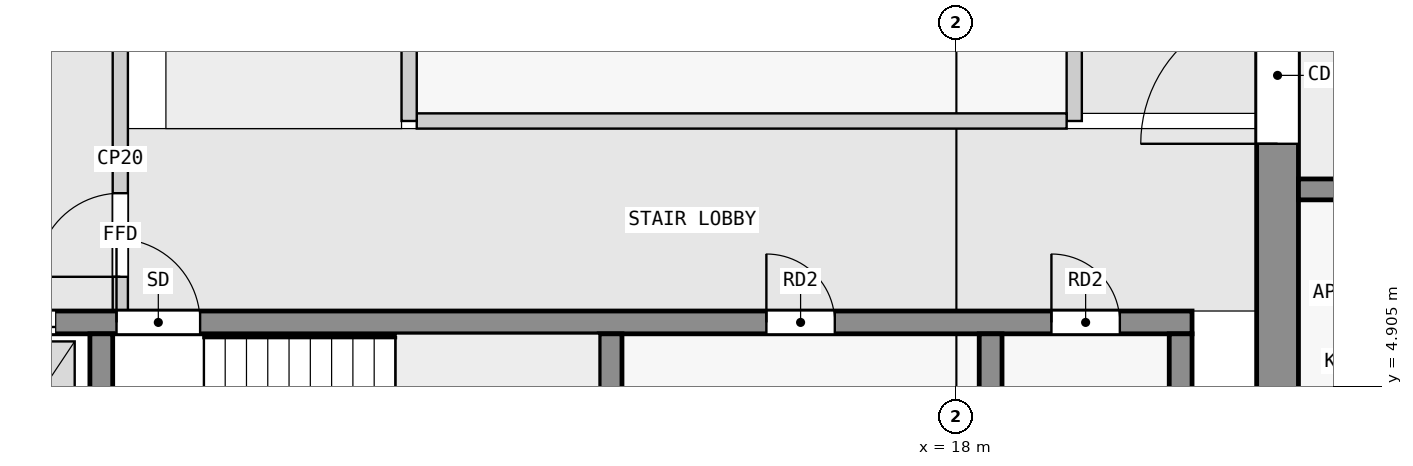
"""IFC4 building model, lengths in metres.
Left out: names, types, materials, properties, quantities, classifications, styles, units other than length and angle.
Written with IfcOpenShell. Run it as: python <this file> out.ifc"""

import sys

from ifc_helpers import new_model, si_unit, direction, frame, frame_2d, origin, place, context, subcontext, project, spatial, rectangle, extrude, element, fill, save


model = new_model("IFC4")
c1 = context("Model", 3, precision=1e-05, world=origin(), true_north=direction((0.0, 1.0)))
c2 = subcontext(c1, "Body", "Model", "MODEL_VIEW")
j1 = project(units=[si_unit("LENGTHUNIT", "METRE"), si_unit("PLANEANGLEUNIT", "RADIAN")], contexts=[c1])
p1 = place(None, origin())
s1 = spatial("IfcSite", under=j1, at=p1, CompositionType="ELEMENT")
p2 = place(p1, origin())
s2 = spatial("IfcBuilding", under=s1, at=p2, CompositionType="ELEMENT")
p3 = place(p2, frame((0.0, 0.0, 211.9)))
s3 = spatial("IfcBuildingStorey", under=s2, at=p3, CompositionType="ELEMENT", Elevation=211.9)
p4 = place(p3, frame((22.225, 2.5, 0.0), z_axis=(0.0, 0.0, 1.0), x_axis=(0.0, 1.0, 0.0)))
e1 = element("IfcWall", 1, at=p4, inside=s3, PredefinedType="SHEAR", context=c2, shape_type="SweptSolid", body=[
    extrude(rectangle(XDim=14.95, YDim=0.55, at=frame_2d((7.475, 0.0))), origin(), (0.0, 0.0, 1.0), 3.25),
])
p5 = place(p4, frame((5.6, 0.0, 0.0)))
e2 = element("IfcOpeningElement", 2, at=p5, cuts=e1, PredefinedType="OPENING", context=c2, shape_type="SweptSolid", body=[
    extrude(rectangle(XDim=1.8, YDim=2.1, at=frame_2d((0.9, 1.05))), frame((0.0, 0.285, 0.0), z_axis=(0.0, -1.0, 0.0), x_axis=(1.0, 0.0, 0.0)), (0.0, 0.0, 1.0), 0.57),
])
for number, where, z_axis, x_axis in (
    (3, (6.75, 2.8, 0.0), (0.0, 0.0, 1.0), (0.0, 1.0, 0.0)),
    (4, (13.45, 2.8, 0.0), (0.0, 0.0, 1.0), (0.0, 1.0, 0.0)),
    (5, (18.45, 2.8, 0.0), (0.0, 0.0, 1.0), (0.0, 1.0, 0.0)),
    (6, (20.95, 2.8, 0.0), (0.0, 0.0, 1.0), (0.0, 1.0, 0.0)),
):
    element("IfcWall", number, at=place(p3, frame(where, z_axis=z_axis, x_axis=x_axis)), inside=s3, PredefinedType="SHEAR", context=c2, shape_type="SweptSolid", body=[
        extrude(rectangle(XDim=2.8, YDim=0.3, at=frame_2d((1.4, 0.0))), origin(), (0.0, 0.0, 1.0), 3.25),
    ])
p6 = place(p3, frame((2.3, 5.75, 0.0), z_axis=(0.0, 0.0, 1.0), x_axis=(1.0, 0.0, 0.0)))
e7 = element("IfcWall", 7, at=p6, inside=s3, PredefinedType="SHEAR", context=c2, shape_type="SweptSolid", body=[
    extrude(rectangle(XDim=18.8, YDim=0.3, at=frame_2d((9.4, 0.0))), origin(), (0.0, 0.0, 1.0), 3.25),
])
p7 = place(p6, frame((4.65, 0.0, 0.0)))
e8 = element("IfcOpeningElement", 8, at=p7, cuts=e7, PredefinedType="OPENING", context=c2, shape_type="SweptSolid", body=[
    extrude(rectangle(XDim=1.1, YDim=2.1, at=frame_2d((0.55, 1.05))), frame((0.0, 0.16, 0.0), z_axis=(0.0, -1.0, 0.0), x_axis=(1.0, 0.0, 0.0)), (0.0, 0.0, 1.0), 0.32),
])
p8 = place(p6, frame((0.45, 0.0, 0.0)))
e9 = element("IfcOpeningElement", 9, at=p8, cuts=e7, PredefinedType="OPENING", context=c2, shape_type="SweptSolid", body=[
    extrude(rectangle(XDim=1.1, YDim=2.1, at=frame_2d((0.55, 1.05))), frame((0.0, 0.16, 0.0), z_axis=(0.0, -1.0, 0.0), x_axis=(1.0, 0.0, 0.0)), (0.0, 0.0, 1.0), 0.32),
])
p9 = place(p6, frame((2.75, 0.0, 0.0)))
e10 = element("IfcOpeningElement", 10, at=p9, cuts=e7, PredefinedType="OPENING", context=c2, shape_type="SweptSolid", body=[
    extrude(rectangle(XDim=1.1, YDim=2.1, at=frame_2d((0.55, 1.05))), frame((0.0, 0.16, 0.0), z_axis=(0.0, -1.0, 0.0), x_axis=(1.0, 0.0, 0.0)), (0.0, 0.0, 1.0), 0.32),
])
p10 = place(p6, frame((13.2, 0.0, 0.0)))
e11 = element("IfcOpeningElement", 11, at=p10, cuts=e7, PredefinedType="OPENING", context=c2, shape_type="SweptSolid", body=[
    extrude(rectangle(XDim=0.9, YDim=2.1, at=frame_2d((0.45, 1.05))), frame((0.0, 0.16, 0.0), z_axis=(0.0, -1.0, 0.0), x_axis=(1.0, 0.0, 0.0)), (0.0, 0.0, 1.0), 0.32),
])
p11 = place(p6, frame((16.95, 0.0, 0.0)))
e12 = element("IfcOpeningElement", 12, at=p11, cuts=e7, PredefinedType="OPENING", context=c2, shape_type="SweptSolid", body=[
    extrude(rectangle(XDim=0.9, YDim=2.1, at=frame_2d((0.45, 1.05))), frame((0.0, 0.16, 0.0), z_axis=(0.0, -1.0, 0.0), x_axis=(1.0, 0.0, 0.0)), (0.0, 0.0, 1.0), 0.32),
])
p12 = place(p3, frame((22.5, 7.5, 0.0), z_axis=(0.0, 0.0, 1.0), x_axis=(1.0, 0.0, 0.0)))
e13 = element("IfcWall", 13, at=p12, inside=s3, PredefinedType="SHEAR", context=c2, shape_type="SweptSolid", body=[
    extrude(rectangle(XDim=22.5, YDim=0.275, at=frame_2d((11.25, 0.0))), origin(), (0.0, 0.0, 1.0), 3.25),
])
p13 = place(p12, frame((4.05, 0.0, 0.0)))
e14 = element("IfcOpeningElement", 14, at=p13, cuts=e13, PredefinedType="OPENING", context=c2, shape_type="SweptSolid", body=[
    extrude(rectangle(XDim=1.0, YDim=2.1, at=frame_2d((0.5, 1.05))), frame((0.0, 0.147, 0.0), z_axis=(0.0, -1.0, 0.0), x_axis=(1.0, 0.0, 0.0)), (0.0, 0.0, 1.0), 0.295),
])
p14 = place(p12, frame((10.75, 0.0, 0.0)))
e15 = element("IfcOpeningElement", 15, at=p14, cuts=e13, PredefinedType="OPENING", context=c2, shape_type="SweptSolid", body=[
    extrude(rectangle(XDim=1.0, YDim=2.1, at=frame_2d((0.5, 1.05))), frame((0.0, 0.147, 0.0), z_axis=(0.0, -1.0, 0.0), x_axis=(1.0, 0.0, 0.0)), (0.0, 0.0, 1.0), 0.295),
])
p15 = place(p12, frame((15.25, 0.0, 0.0)))
e16 = element("IfcOpeningElement", 16, at=p15, cuts=e13, PredefinedType="OPENING", context=c2, shape_type="SweptSolid", body=[
    extrude(rectangle(XDim=1.0, YDim=2.1, at=frame_2d((0.5, 1.05))), frame((0.0, 0.147, 0.0), z_axis=(0.0, -1.0, 0.0), x_axis=(1.0, 0.0, 0.0)), (0.0, 0.0, 1.0), 0.295),
])
p16 = place(p12, frame((18.75, 0.0, 0.0)))
e17 = element("IfcOpeningElement", 17, at=p16, cuts=e13, PredefinedType="OPENING", context=c2, shape_type="SweptSolid", body=[
    extrude(rectangle(XDim=0.9, YDim=2.1, at=frame_2d((0.45, 1.05))), frame((0.0, 0.147, 0.0), z_axis=(0.0, -1.0, 0.0), x_axis=(1.0, 0.0, 0.0)), (0.0, 0.0, 1.0), 0.295),
])
p17 = place(p12, frame((20.95, 0.0, 0.0)))
e18 = element("IfcOpeningElement", 18, at=p17, cuts=e13, PredefinedType="OPENING", context=c2, shape_type="SweptSolid", body=[
    extrude(rectangle(XDim=1.0, YDim=2.1, at=frame_2d((0.5, 1.05))), frame((0.0, 0.147, 0.0), z_axis=(0.0, -1.0, 0.0), x_axis=(1.0, 0.0, 0.0)), (0.0, 0.0, 1.0), 0.295),
])
p18 = place(p3, frame((7.0, 5.9, 0.0), z_axis=(0.0, 0.0, 1.0), x_axis=(0.0, 1.0, 0.0)))
e19 = element("IfcWall", 19, at=p18, inside=s3, PredefinedType="PARTITIONING", context=c2, shape_type="SweptSolid", body=[
    extrude(rectangle(XDim=4.0, YDim=0.2, at=frame_2d((2.0, 0.0))), origin(), (0.0, 0.0, 1.0), 3.25),
])
p19 = place(p18, frame((0.45, 0.0, 0.0)))
e20 = element("IfcOpeningElement", 20, at=p19, cuts=e19, PredefinedType="OPENING", context=c2, shape_type="SweptSolid", body=[
    extrude(rectangle(XDim=1.1, YDim=2.1, at=frame_2d((0.55, 1.05))), frame((0.0, 0.11, 0.0), z_axis=(0.0, -1.0, 0.0), x_axis=(1.0, 0.0, 0.0)), (0.0, 0.0, 1.0), 0.22),
])
p20 = place(p3, frame((10.8, 8.4, 0.0), z_axis=(0.0, 0.0, 1.0), x_axis=(0.0, 1.0, 0.0)))
e21 = element("IfcWall", 21, at=p20, inside=s3, PredefinedType="PARTITIONING", context=c2, shape_type="SweptSolid", body=[
    extrude(rectangle(XDim=3.8, YDim=0.2, at=frame_2d((1.9, 0.0))), origin(), (0.0, 0.0, 1.0), 3.25),
])
p21 = place(p3, frame((10.9, 8.4, 0.0), z_axis=(0.0, 0.0, 1.0), x_axis=(1.0, 0.0, 0.0)))
e22 = element("IfcWall", 22, at=p21, inside=s3, PredefinedType="PARTITIONING", context=c2, shape_type="SweptSolid", body=[
    extrude(rectangle(XDim=8.55, YDim=0.2, at=frame_2d((4.275, 0.0))), origin(), (0.0, 0.0, 1.0), 3.25),
])
p22 = place(p3, frame((19.55, 8.4, 0.0), z_axis=(0.0, 0.0, 1.0), x_axis=(0.0, 1.0, 0.0)))
e23 = element("IfcWall", 23, at=p22, inside=s3, PredefinedType="PARTITIONING", context=c2, shape_type="SweptSolid", body=[
    extrude(rectangle(XDim=3.8, YDim=0.2, at=frame_2d((1.9, 0.0))), origin(), (0.0, 0.0, 1.0), 3.25),
])
p23 = place(p19, origin())
e24 = element("IfcDoor", 24, at=p23, inside=s3, OperationType="SINGLE_SWING_LEFT", PredefinedType="DOOR", context=c2, shape_type="SweptSolid", body=[
    extrude(rectangle(XDim=1.1, YDim=2.1, at=frame_2d((0.55, 1.05))), frame((0.0, 0.025, 0.0), z_axis=(0.0, -1.0, 0.0), x_axis=(1.0, 0.0, 0.0)), (0.0, 0.0, 1.0), 0.05),
])
fill(e20, e24)
p24 = place(p7, origin())
e25 = element("IfcDoor", 25, at=p24, inside=s3, OperationType="SINGLE_SWING_LEFT", PredefinedType="DOOR", context=c2, shape_type="SweptSolid", body=[
    extrude(rectangle(XDim=1.1, YDim=2.1, at=frame_2d((0.55, 1.05))), frame((0.0, 0.025, 0.0), z_axis=(0.0, -1.0, 0.0), x_axis=(1.0, 0.0, 0.0)), (0.0, 0.0, 1.0), 0.05),
])
fill(e8, e25)
p25 = place(p9, origin())
e26 = element("IfcDoor", 26, at=p25, inside=s3, OperationType="DOUBLE_DOOR_SLIDING", PredefinedType="DOOR", context=c2, shape_type="SweptSolid", body=[
    extrude(rectangle(XDim=1.1, YDim=2.1, at=frame_2d((0.55, 1.05))), frame((0.0, 0.025, 0.0), z_axis=(0.0, -1.0, 0.0), x_axis=(1.0, 0.0, 0.0)), (0.0, 0.0, 1.0), 0.05),
])
fill(e10, e26)
p26 = place(p5, origin())
e27 = element("IfcDoor", 27, at=p26, inside=s3, OperationType="DOUBLE_DOOR_SINGLE_SWING", PredefinedType="DOOR", context=c2, shape_type="SweptSolid", body=[
    extrude(rectangle(XDim=1.8, YDim=2.1, at=frame_2d((0.9, 1.05))), frame((0.0, 0.025, 0.0), z_axis=(0.0, -1.0, 0.0), x_axis=(1.0, 0.0, 0.0)), (0.0, 0.0, 1.0), 0.05),
])
fill(e2, e27)
p27 = place(p10, origin())
e28 = element("IfcDoor", 28, at=p27, inside=s3, OperationType="SINGLE_SWING_LEFT", PredefinedType="DOOR", context=c2, shape_type="SweptSolid", body=[
    extrude(rectangle(XDim=0.9, YDim=2.1, at=frame_2d((0.45, 1.05))), frame((0.0, 0.025, 0.0), z_axis=(0.0, -1.0, 0.0), x_axis=(1.0, 0.0, 0.0)), (0.0, 0.0, 1.0), 0.05),
])
fill(e11, e28)
p28 = place(p11, origin())
e29 = element("IfcDoor", 29, at=p28, inside=s3, OperationType="SINGLE_SWING_LEFT", PredefinedType="DOOR", context=c2, shape_type="SweptSolid", body=[
    extrude(rectangle(XDim=0.9, YDim=2.1, at=frame_2d((0.45, 1.05))), frame((0.0, 0.025, 0.0), z_axis=(0.0, -1.0, 0.0), x_axis=(1.0, 0.0, 0.0)), (0.0, 0.0, 1.0), 0.05),
])
fill(e12, e29)
save(model, sys.argv[1])
